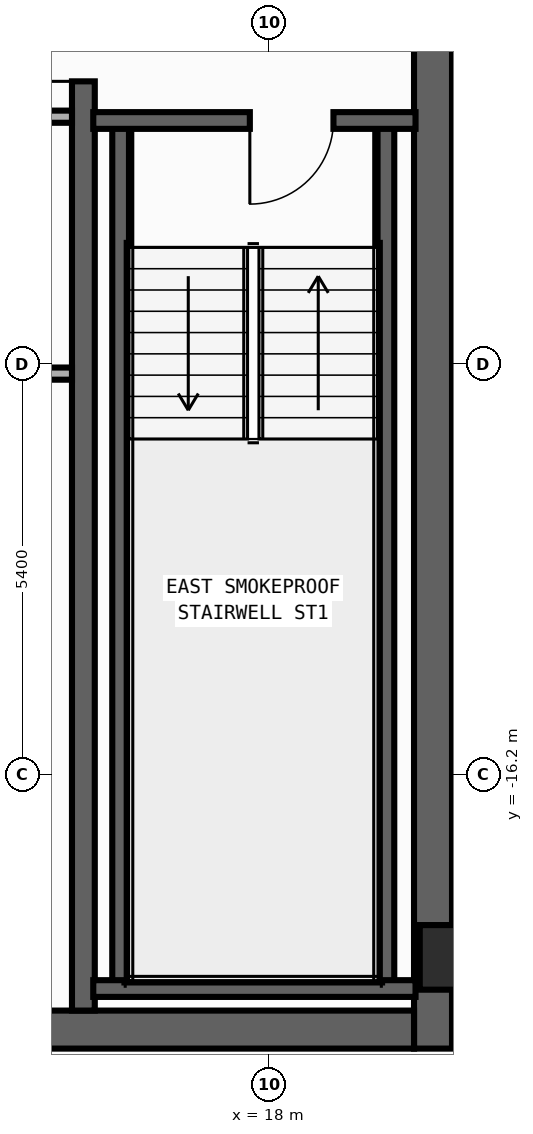
"""IFC4 building model, lengths in metres.
Left out: names, types, materials, properties, quantities, classifications, styles, units other than length and angle.
Written with IfcOpenShell. Run it as: python <this file> out.ifc"""

import sys

from ifc_helpers import new_model, si_unit, direction, frame, frame_2d, origin, origin_2d, place, context, subcontext, project, spatial, rectangle, extrude, element, fill, save


model = new_model("IFC4")
c1 = context("Model", 3, precision=1e-05, world=origin(), true_north=direction((0.0, 1.0)))
c2 = subcontext(c1, "Body", "Model", "MODEL_VIEW")
j1 = project(units=[si_unit("LENGTHUNIT", "METRE"), si_unit("PLANEANGLEUNIT", "RADIAN")], contexts=[c1])
p1 = place(None, origin())
s1 = spatial("IfcSite", under=j1, at=p1, CompositionType="ELEMENT")
p2 = place(p1, origin())
s2 = spatial("IfcBuilding", under=s1, at=p2, CompositionType="ELEMENT")
p3 = place(p2, frame((0.0, 0.0, 269.2)))
s3 = spatial("IfcBuildingStorey", under=s2, at=p3, CompositionType="ELEMENT", Elevation=269.2)
p4 = place(p3, frame((20.15, -19.8, 0.0), z_axis=(0.0, 0.0, 1.0), x_axis=(0.0, 1.0, 0.0)))
e1 = element("IfcWall", 1, at=p4, inside=s3, PredefinedType="SHEAR", context=c2, shape_type="SweptSolid", body=[
    extrude(rectangle(XDim=27.0, YDim=0.5, at=frame_2d((13.5, 0.0))), origin(), (0.0, 0.0, 1.0), 3.25),
])
p5 = place(p3, frame((12.5, -19.55, 0.0), z_axis=(0.0, 0.0, 1.0), x_axis=(1.0, 0.0, 0.0)))
e2 = element("IfcWall", 2, at=p5, inside=s3, PredefinedType="SHEAR", context=c2, shape_type="SweptSolid", body=[
    extrude(rectangle(XDim=7.4, YDim=0.5, at=frame_2d((3.7, 0.0))), origin(), (0.0, 0.0, 1.0), 3.25),
])
p6 = place(p3, frame((15.55, -19.3, 0.0), z_axis=(0.0, 0.0, 1.0), x_axis=(0.0, 1.0, 0.0)))
e3 = element("IfcWall", 3, at=p6, inside=s3, PredefinedType="SHEAR", context=c2, shape_type="SweptSolid", body=[
    extrude(rectangle(XDim=26.0, YDim=0.3, at=frame_2d((13.0, 0.0))), origin(), (0.0, 0.0, 1.0), 3.25),
])
p7 = place(p6, frame((12.225, 0.0, 0.0)))
e4 = element("IfcOpeningElement", 4, at=p7, cuts=e3, PredefinedType="OPENING", context=c2, shape_type="SweptSolid", body=[
    extrude(rectangle(XDim=1.15, YDim=2.2, at=frame_2d((0.575, 1.1))), frame((0.0, 0.16, 0.0), z_axis=(0.0, -1.0, 0.0), x_axis=(1.0, 0.0, 0.0)), (0.0, 0.0, 1.0), 0.32),
])
p8 = place(p6, frame((24.625, 0.0, 0.0)))
e5 = element("IfcOpeningElement", 5, at=p8, cuts=e3, PredefinedType="OPENING", context=c2, shape_type="SweptSolid", body=[
    extrude(rectangle(XDim=0.85, YDim=2.1, at=frame_2d((0.425, 1.05))), frame((0.0, 0.16, 0.0), z_axis=(0.0, -1.0, 0.0), x_axis=(1.0, 0.0, 0.0)), (0.0, 0.0, 1.0), 0.32),
])
for number, where, z_axis, x_axis in (
    (6, (16.04, -19.01, 0.0), (0.0, 0.0, 1.0), (0.0, 1.0, 0.0)),
    (7, (19.53, -19.01, 0.0), (0.0, 0.0, 1.0), (0.0, 1.0, 0.0)),
):
    element("IfcWall", number, at=place(p3, frame(where, z_axis=z_axis, x_axis=x_axis)), inside=s3, PredefinedType="SHEAR", context=c2, shape_type="SweptSolid", body=[
        extrude(rectangle(XDim=11.42, YDim=0.22, at=frame_2d((5.71, 0.0))), origin(), (0.0, 0.0, 1.0), 3.25),
    ])
p9 = place(p3, frame((15.68, -19.01, 0.0), z_axis=(0.0, 0.0, 1.0), x_axis=(1.0, 0.0, 0.0)))
e8 = element("IfcWall", 8, at=p9, inside=s3, PredefinedType="SHEAR", context=c2, shape_type="SweptSolid", body=[
    extrude(rectangle(XDim=4.24, YDim=0.22, at=frame_2d((2.12, 0.0))), origin(), (0.0, 0.0, 1.0), 3.25),
])
p10 = place(p3, frame((19.92, -7.59, 0.0), z_axis=(0.0, 0.0, 1.0), x_axis=(-1.0, 0.0, 0.0)))
e9 = element("IfcWall", 9, at=p10, inside=s3, PredefinedType="SHEAR", context=c2, shape_type="SweptSolid", body=[
    extrude(rectangle(XDim=4.24, YDim=0.22, at=frame_2d((2.12, 0.0))), origin(), (0.0, 0.0, 1.0), 3.25),
])
p11 = place(p10, frame((1.08, 0.0, 0.0)))
e10 = element("IfcOpeningElement", 10, at=p11, cuts=e9, PredefinedType="OPENING", context=c2, shape_type="SweptSolid", body=[
    extrude(rectangle(XDim=1.1, YDim=2.2, at=frame_2d((0.55, 1.1))), frame((0.0, 0.12, 0.0), z_axis=(0.0, -1.0, 0.0), x_axis=(1.0, 0.0, 0.0)), (0.0, 0.0, 1.0), 0.24),
])
p12 = place(p3, frame((20.4, -18.6, 0.0), z_axis=(0.0, 0.0, 1.0), x_axis=(1.0, 0.0, 0.0)))
e11 = element("IfcColumn", 11, at=p12, inside=s3, PredefinedType="COLUMN", context=c2, shape_type="SweptSolid", body=[
    extrude(rectangle(XDim=0.85, YDim=0.85, at=origin_2d()), origin(), (0.0, 0.0, 1.0), 3.6),
])
p13 = place(p3, frame((12.8, -7.54, 0.0), z_axis=(0.0, 0.0, 1.0), x_axis=(1.0, 0.0, 0.0)))
e12 = element("IfcWall", 12, at=p13, inside=s3, PredefinedType="STANDARD", context=c2, shape_type="SweptSolid", body=[
    extrude(rectangle(XDim=2.6, YDim=0.16, at=frame_2d((1.3, 0.0))), origin(), (0.0, 0.0, 1.0), 3.25),
])
p14 = place(p3, frame((12.5, -10.92, 0.0), z_axis=(0.0, 0.0, 1.0), x_axis=(1.0, 0.0, 0.0)))
e13 = element("IfcWall", 13, at=p14, inside=s3, PredefinedType="PARTITIONING", context=c2, shape_type="SweptSolid", body=[
    extrude(rectangle(XDim=2.9, YDim=0.16, at=frame_2d((1.45, 0.0))), origin(), (0.0, 0.0, 1.0), 2.35),
])
p15 = place(p11, origin())
e14 = element("IfcDoor", 14, at=p15, inside=s3, OperationType="SINGLE_SWING_RIGHT", PredefinedType="DOOR", context=c2, shape_type="SweptSolid", body=[
    extrude(rectangle(XDim=1.1, YDim=2.2, at=frame_2d((0.55, 1.1))), frame((0.0, 0.025, 0.0), z_axis=(0.0, -1.0, 0.0), x_axis=(1.0, 0.0, 0.0)), (0.0, 0.0, 1.0), 0.05),
])
fill(e10, e14)
p16 = place(p7, origin())
e15 = element("IfcDoor", 15, at=p16, inside=s3, OperationType="SINGLE_SWING_LEFT", PredefinedType="DOOR", context=c2, shape_type="SweptSolid", body=[
    extrude(rectangle(XDim=1.15, YDim=2.2, at=frame_2d((0.575, 1.1))), frame((0.0, 0.025, 0.0), z_axis=(0.0, -1.0, 0.0), x_axis=(1.0, 0.0, 0.0)), (0.0, 0.0, 1.0), 0.05),
])
fill(e4, e15)
save(model, sys.argv[1])
